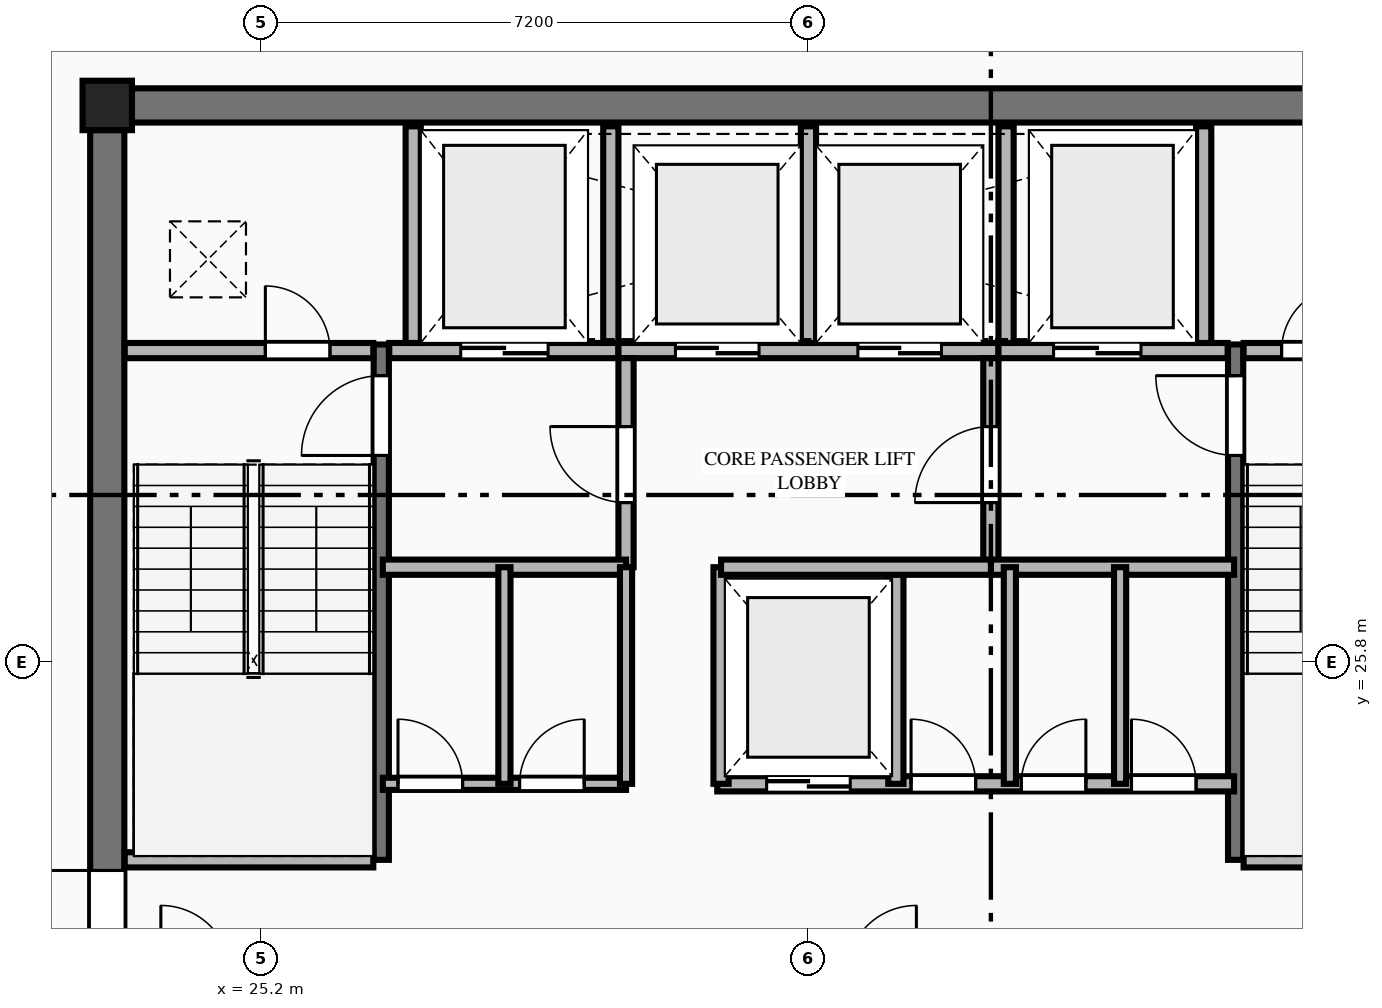
"""IFC4 building model, lengths in metres.
Left out: names, types, materials, properties, quantities, classifications, styles, units other than length and angle.
Written with IfcOpenShell. Run it as: python <this file> out.ifc"""

import sys

from ifc_helpers import new_model, si_unit, direction, frame, frame_2d, origin, origin_2d, place, context, subcontext, project, spatial, rectangle, extrude, element, fill, save


model = new_model("IFC4")
c1 = context("Model", 3, precision=1e-05, world=origin(), true_north=direction((0.0, 1.0)))
c2 = subcontext(c1, "Body", "Model", "MODEL_VIEW")
j1 = project(units=[si_unit("LENGTHUNIT", "METRE"), si_unit("PLANEANGLEUNIT", "RADIAN")], contexts=[c1])
p1 = place(None, origin())
s1 = spatial("IfcSite", under=j1, at=p1, CompositionType="ELEMENT")
p2 = place(p1, origin())
s2 = spatial("IfcBuilding", under=s1, at=p2, CompositionType="ELEMENT")
p3 = place(p2, frame((0.0, 0.0, 259.85)))
s3 = spatial("IfcBuildingStorey", under=s2, at=p3, CompositionType="ELEMENT", Elevation=259.85)
p4 = place(p3, frame((23.175, 33.125, 0.0), z_axis=(0.0, 0.0, 1.0), x_axis=(1.0, 0.0, 0.0)))
e1 = element("IfcColumn", 1, at=p4, inside=s3, PredefinedType="COLUMN", context=c2, shape_type="SweptSolid", body=[
    extrude(rectangle(XDim=0.65, YDim=0.65, at=origin_2d()), origin(), (0.0, 0.0, 1.0), 3.65),
])
p5 = place(p3, frame((23.5, 33.125, 0.0), z_axis=(0.0, 0.0, 1.0), x_axis=(1.0, 0.0, 0.0)))
e2 = element("IfcWall", 2, at=p5, inside=s3, PredefinedType="SHEAR", context=c2, shape_type="SweptSolid", body=[
    extrude(rectangle(XDim=17.8, YDim=0.45, at=frame_2d((8.9, 0.0))), origin(), (0.0, 0.0, 1.0), 3.45),
])
p6 = place(p3, frame((23.175, 19.0, 0.0), z_axis=(0.0, 0.0, 1.0), x_axis=(0.0, 1.0, 0.0)))
e3 = element("IfcWall", 3, at=p6, inside=s3, PredefinedType="SHEAR", context=c2, shape_type="SweptSolid", body=[
    extrude(rectangle(XDim=13.8, YDim=0.45, at=frame_2d((6.9, 0.0))), origin(), (0.0, 0.0, 1.0), 3.45),
])
p7 = place(p6, frame((2.84, 0.0, 0.0)))
e4 = element("IfcOpeningElement", 4, at=p7, cuts=e3, PredefinedType="OPENING", context=c2, shape_type="SweptSolid", body=[
    extrude(rectangle(XDim=1.22, YDim=2.25, at=frame_2d((0.61, 1.125))), frame((0.0, 0.235, 0.0), z_axis=(0.0, -1.0, 0.0), x_axis=(1.0, 0.0, 0.0)), (0.0, 0.0, 1.0), 0.47),
])
p8 = place(p3, frame((26.78, 23.2, 0.0), z_axis=(0.0, 0.0, 1.0), x_axis=(0.0, 1.0, 0.0)))
e5 = element("IfcWall", 5, at=p8, inside=s3, PredefinedType="SHEAR", context=c2, shape_type="SweptSolid", body=[
    extrude(rectangle(XDim=6.78, YDim=0.2, at=frame_2d((3.39, 0.0))), origin(), (0.0, 0.0, 1.0), 3.65),
])
p9 = place(p8, frame((5.32, 0.0, 0.0)))
e6 = element("IfcOpeningElement", 6, at=p9, cuts=e5, PredefinedType="OPENING", context=c2, shape_type="SweptSolid", body=[
    extrude(rectangle(XDim=1.05, YDim=2.15, at=frame_2d((0.525, 1.075))), frame((0.0, 0.11, 0.0), z_axis=(0.0, -1.0, 0.0), x_axis=(1.0, 0.0, 0.0)), (0.0, 0.0, 1.0), 0.22),
])
p10 = place(p3, frame((23.405, 23.2, 0.0), z_axis=(0.0, 0.0, 1.0), x_axis=(1.0, 0.0, 0.0)))
e7 = element("IfcWall", 7, at=p10, inside=s3, PredefinedType="PLUMBINGWALL", context=c2, shape_type="SweptSolid", body=[
    extrude(rectangle(XDim=3.27, YDim=0.2, at=frame_2d((1.635, 0.0))), origin(), (0.0, 0.0, 1.0), 3.45),
])
p11 = place(p3, frame((38.02, 23.2, 0.0), z_axis=(0.0, 0.0, 1.0), x_axis=(0.0, 1.0, 0.0)))
e8 = element("IfcWall", 8, at=p11, inside=s3, PredefinedType="SHEAR", context=c2, shape_type="SweptSolid", body=[
    extrude(rectangle(XDim=6.78, YDim=0.2, at=frame_2d((3.39, 0.0))), origin(), (0.0, 0.0, 1.0), 3.65),
])
p12 = place(p11, frame((5.32, 0.0, 0.0)))
e9 = element("IfcOpeningElement", 9, at=p12, cuts=e8, PredefinedType="OPENING", context=c2, shape_type="SweptSolid", body=[
    extrude(rectangle(XDim=1.05, YDim=2.15, at=frame_2d((0.525, 1.075))), frame((0.0, 0.11, 0.0), z_axis=(0.0, -1.0, 0.0), x_axis=(1.0, 0.0, 0.0)), (0.0, 0.0, 1.0), 0.22),
])
p13 = place(p3, frame((38.125, 23.2, 0.0), z_axis=(0.0, 0.0, 1.0), x_axis=(1.0, 0.0, 0.0)))
e10 = element("IfcWall", 10, at=p13, inside=s3, PredefinedType="PLUMBINGWALL", context=c2, shape_type="SweptSolid", body=[
    extrude(rectangle(XDim=3.27, YDim=0.2, at=frame_2d((1.635, 0.0))), origin(), (0.0, 0.0, 1.0), 3.45),
])
p14 = place(p3, frame((23.405, 29.9, 0.0), z_axis=(0.0, 0.0, 1.0), x_axis=(1.0, 0.0, 0.0)))
e11 = element("IfcWall", 11, at=p14, inside=s3, PredefinedType="PLUMBINGWALL", context=c2, shape_type="SweptSolid", body=[
    extrude(rectangle(XDim=3.27, YDim=0.2, at=frame_2d((1.635, 0.0))), origin(), (0.0, 0.0, 1.0), 3.45),
])
p15 = place(p14, frame((1.85, 0.0, 0.0)))
e12 = element("IfcOpeningElement", 12, at=p15, cuts=e11, PredefinedType="OPENING", context=c2, shape_type="SweptSolid", body=[
    extrude(rectangle(XDim=0.85, YDim=2.05, at=frame_2d((0.425, 1.025))), frame((0.0, 0.11, 0.0), z_axis=(0.0, -1.0, 0.0), x_axis=(1.0, 0.0, 0.0)), (0.0, 0.0, 1.0), 0.22),
])
p16 = place(p3, frame((26.885, 29.9, 0.0), z_axis=(0.0, 0.0, 1.0), x_axis=(1.0, 0.0, 0.0)))
e13 = element("IfcWall", 13, at=p16, inside=s3, PredefinedType="PLUMBINGWALL", context=c2, shape_type="SweptSolid", body=[
    extrude(rectangle(XDim=3.015, YDim=0.2, at=frame_2d((1.507, 0.0))), origin(), (0.0, 0.0, 1.0), 3.45),
])
p17 = place(p16, frame((0.94, 0.0, 0.0)))
e14 = element("IfcOpeningElement", 14, at=p17, cuts=e13, PredefinedType="OPENING", context=c2, shape_type="SweptSolid", body=[
    extrude(rectangle(XDim=1.15, YDim=2.2, at=frame_2d((0.575, 1.1))), frame((0.0, 0.11, 0.0), z_axis=(0.0, -1.0, 0.0), x_axis=(1.0, 0.0, 0.0)), (0.0, 0.0, 1.0), 0.22),
])
p18 = place(p3, frame((29.9, 29.9, 0.0), z_axis=(0.0, 0.0, 1.0), x_axis=(1.0, 0.0, 0.0)))
e15 = element("IfcWall", 15, at=p18, inside=s3, PredefinedType="PLUMBINGWALL", context=c2, shape_type="SweptSolid", body=[
    extrude(rectangle(XDim=5.0, YDim=0.2, at=frame_2d((2.5, 0.0))), origin(), (0.0, 0.0, 1.0), 3.45),
])
p19 = place(p18, frame((0.75, 0.0, 0.0)))
e16 = element("IfcOpeningElement", 16, at=p19, cuts=e15, PredefinedType="OPENING", context=c2, shape_type="SweptSolid", body=[
    extrude(rectangle(XDim=1.1, YDim=2.2, at=frame_2d((0.55, 1.1))), frame((0.0, 0.11, 0.0), z_axis=(0.0, -1.0, 0.0), x_axis=(1.0, 0.0, 0.0)), (0.0, 0.0, 1.0), 0.22),
])
p20 = place(p18, frame((3.15, 0.0, 0.0)))
e17 = element("IfcOpeningElement", 17, at=p20, cuts=e15, PredefinedType="OPENING", context=c2, shape_type="SweptSolid", body=[
    extrude(rectangle(XDim=1.1, YDim=2.2, at=frame_2d((0.55, 1.1))), frame((0.0, 0.11, 0.0), z_axis=(0.0, -1.0, 0.0), x_axis=(1.0, 0.0, 0.0)), (0.0, 0.0, 1.0), 0.22),
])
p21 = place(p3, frame((34.9, 29.9, 0.0), z_axis=(0.0, 0.0, 1.0), x_axis=(1.0, 0.0, 0.0)))
e18 = element("IfcWall", 18, at=p21, inside=s3, PredefinedType="PLUMBINGWALL", context=c2, shape_type="SweptSolid", body=[
    extrude(rectangle(XDim=3.015, YDim=0.2, at=frame_2d((1.508, 0.0))), origin(), (0.0, 0.0, 1.0), 3.45),
])
p22 = place(p21, frame((0.725, 0.0, 0.0)))
e19 = element("IfcOpeningElement", 19, at=p22, cuts=e18, PredefinedType="OPENING", context=c2, shape_type="SweptSolid", body=[
    extrude(rectangle(XDim=1.15, YDim=2.2, at=frame_2d((0.575, 1.1))), frame((0.0, 0.11, 0.0), z_axis=(0.0, -1.0, 0.0), x_axis=(1.0, 0.0, 0.0)), (0.0, 0.0, 1.0), 0.22),
])
p23 = place(p3, frame((38.125, 29.9, 0.0), z_axis=(0.0, 0.0, 1.0), x_axis=(1.0, 0.0, 0.0)))
e20 = element("IfcWall", 20, at=p23, inside=s3, PredefinedType="PLUMBINGWALL", context=c2, shape_type="SweptSolid", body=[
    extrude(rectangle(XDim=3.27, YDim=0.2, at=frame_2d((1.635, 0.0))), origin(), (0.0, 0.0, 1.0), 3.45),
])
p24 = place(p23, frame((0.5, 0.0, 0.0)))
e21 = element("IfcOpeningElement", 21, at=p24, cuts=e20, PredefinedType="OPENING", context=c2, shape_type="SweptSolid", body=[
    extrude(rectangle(XDim=0.85, YDim=2.05, at=frame_2d((0.425, 1.025))), frame((0.0, 0.11, 0.0), z_axis=(0.0, -1.0, 0.0), x_axis=(1.0, 0.0, 0.0)), (0.0, 0.0, 1.0), 0.22),
])
for number, where, z_axis, x_axis in (
    (22, (27.2, 30.0, 0.0), (0.0, 0.0, 1.0), (0.0, 1.0, 0.0)),
    (23, (29.8, 30.0, 0.0), (0.0, 0.0, 1.0), (0.0, 1.0, 0.0)),
    (24, (32.4, 30.0, 0.0), (0.0, 0.0, 1.0), (0.0, 1.0, 0.0)),
    (25, (35.0, 30.0, 0.0), (0.0, 0.0, 1.0), (0.0, 1.0, 0.0)),
    (26, (37.6, 30.0, 0.0), (0.0, 0.0, 1.0), (0.0, 1.0, 0.0)),
):
    element("IfcWall", number, at=place(p3, frame(where, z_axis=z_axis, x_axis=x_axis)), inside=s3, PredefinedType="PLUMBINGWALL", context=c2, shape_type="SweptSolid", body=[
        extrude(rectangle(XDim=2.85, YDim=0.2, at=frame_2d((1.425, 0.0))), origin(), (0.0, 0.0, 1.0), 3.45),
    ])
p25 = place(p3, frame((30.0, 27.05, 0.0), z_axis=(0.0, 0.0, 1.0), x_axis=(0.0, 1.0, 0.0)))
e27 = element("IfcWall", 27, at=p25, inside=s3, PredefinedType="PLUMBINGWALL", context=c2, shape_type="SweptSolid", body=[
    extrude(rectangle(XDim=2.75, YDim=0.2, at=frame_2d((1.375, 0.0))), origin(), (0.0, 0.0, 1.0), 3.45),
])
p26 = place(p25, frame((0.85, 0.0, 0.0)))
e28 = element("IfcOpeningElement", 28, at=p26, cuts=e27, PredefinedType="OPENING", context=c2, shape_type="SweptSolid", body=[
    extrude(rectangle(XDim=1.0, YDim=2.15, at=frame_2d((0.5, 1.075))), frame((0.0, 0.11, 0.0), z_axis=(0.0, -1.0, 0.0), x_axis=(1.0, 0.0, 0.0)), (0.0, 0.0, 1.0), 0.22),
])
p27 = place(p3, frame((26.8, 27.05, 0.0), z_axis=(0.0, 0.0, 1.0), x_axis=(1.0, 0.0, 0.0)))
e29 = element("IfcWall", 29, at=p27, inside=s3, PredefinedType="PLUMBINGWALL", context=c2, shape_type="SweptSolid", body=[
    extrude(rectangle(XDim=3.2, YDim=0.2, at=frame_2d((1.6, 0.0))), origin(), (0.0, 0.0, 1.0), 3.45),
])
p28 = place(p3, frame((34.8, 27.05, 0.0), z_axis=(0.0, 0.0, 1.0), x_axis=(0.0, 1.0, 0.0)))
e30 = element("IfcWall", 30, at=p28, inside=s3, PredefinedType="PLUMBINGWALL", context=c2, shape_type="SweptSolid", body=[
    extrude(rectangle(XDim=2.75, YDim=0.2, at=frame_2d((1.375, 0.0))), origin(), (0.0, 0.0, 1.0), 3.45),
])
p29 = place(p28, frame((0.85, 0.0, 0.0)))
e31 = element("IfcOpeningElement", 31, at=p29, cuts=e30, PredefinedType="OPENING", context=c2, shape_type="SweptSolid", body=[
    extrude(rectangle(XDim=1.0, YDim=2.15, at=frame_2d((0.5, 1.075))), frame((0.0, 0.11, 0.0), z_axis=(0.0, -1.0, 0.0), x_axis=(1.0, 0.0, 0.0)), (0.0, 0.0, 1.0), 0.22),
])
p30 = place(p3, frame((34.8, 27.05, 0.0), z_axis=(0.0, 0.0, 1.0), x_axis=(1.0, 0.0, 0.0)))
e32 = element("IfcWall", 32, at=p30, inside=s3, PredefinedType="PLUMBINGWALL", context=c2, shape_type="SweptSolid", body=[
    extrude(rectangle(XDim=3.2, YDim=0.2, at=frame_2d((1.6, 0.0))), origin(), (0.0, 0.0, 1.0), 3.45),
])
p31 = place(p3, frame((26.8, 24.2, 0.0), z_axis=(0.0, 0.0, 1.0), x_axis=(1.0, 0.0, 0.0)))
e33 = element("IfcWall", 33, at=p31, inside=s3, PredefinedType="PARTITIONING", context=c2, shape_type="SweptSolid", body=[
    extrude(rectangle(XDim=3.2, YDim=0.16, at=frame_2d((1.6, 0.0))), origin(), (0.0, 0.0, 1.0), 3.45),
])
p32 = place(p31, frame((0.2, 0.0, 0.0)))
e34 = element("IfcOpeningElement", 34, at=p32, cuts=e33, PredefinedType="OPENING", context=c2, shape_type="SweptSolid", body=[
    extrude(rectangle(XDim=0.85, YDim=2.05, at=frame_2d((0.425, 1.025))), frame((0.0, 0.09, 0.0), z_axis=(0.0, -1.0, 0.0), x_axis=(1.0, 0.0, 0.0)), (0.0, 0.0, 1.0), 0.18),
])
p33 = place(p31, frame((1.8, 0.0, 0.0)))
e35 = element("IfcOpeningElement", 35, at=p33, cuts=e33, PredefinedType="OPENING", context=c2, shape_type="SweptSolid", body=[
    extrude(rectangle(XDim=0.85, YDim=2.05, at=frame_2d((0.425, 1.025))), frame((0.0, 0.09, 0.0), z_axis=(0.0, -1.0, 0.0), x_axis=(1.0, 0.0, 0.0)), (0.0, 0.0, 1.0), 0.18),
])
p34 = place(p3, frame((30.0, 24.2, 0.0), z_axis=(0.0, 0.0, 1.0), x_axis=(0.0, 1.0, 0.0)))
e36 = element("IfcWall", 36, at=p34, inside=s3, PredefinedType="PARTITIONING", context=c2, shape_type="SweptSolid", body=[
    extrude(rectangle(XDim=2.85, YDim=0.16, at=frame_2d((1.425, 0.0))), origin(), (0.0, 0.0, 1.0), 3.45),
])
p35 = place(p3, frame((31.2, 24.2, 0.0), z_axis=(0.0, 0.0, 1.0), x_axis=(1.0, 0.0, 0.0)))
e37 = element("IfcWall", 37, at=p35, inside=s3, PredefinedType="PLUMBINGWALL", context=c2, shape_type="SweptSolid", body=[
    extrude(rectangle(XDim=6.8, YDim=0.2, at=frame_2d((3.4, 0.0))), origin(), (0.0, 0.0, 1.0), 3.45),
])
p36 = place(p35, frame((0.65, 0.0, 0.0)))
e38 = element("IfcOpeningElement", 38, at=p36, cuts=e37, PredefinedType="OPENING", context=c2, shape_type="SweptSolid", body=[
    extrude(rectangle(XDim=1.1, YDim=2.2, at=frame_2d((0.55, 1.1))), frame((0.0, 0.11, 0.0), z_axis=(0.0, -1.0, 0.0), x_axis=(1.0, 0.0, 0.0)), (0.0, 0.0, 1.0), 0.22),
])
p37 = place(p35, frame((2.55, 0.0, 0.0)))
e39 = element("IfcOpeningElement", 39, at=p37, cuts=e37, PredefinedType="OPENING", context=c2, shape_type="SweptSolid", body=[
    extrude(rectangle(XDim=0.85, YDim=2.05, at=frame_2d((0.425, 1.025))), frame((0.0, 0.11, 0.0), z_axis=(0.0, -1.0, 0.0), x_axis=(1.0, 0.0, 0.0)), (0.0, 0.0, 1.0), 0.22),
])
p38 = place(p35, frame((4.0, 0.0, 0.0)))
e40 = element("IfcOpeningElement", 40, at=p38, cuts=e37, PredefinedType="OPENING", context=c2, shape_type="SweptSolid", body=[
    extrude(rectangle(XDim=0.85, YDim=2.05, at=frame_2d((0.425, 1.025))), frame((0.0, 0.11, 0.0), z_axis=(0.0, -1.0, 0.0), x_axis=(1.0, 0.0, 0.0)), (0.0, 0.0, 1.0), 0.22),
])
p39 = place(p35, frame((5.45, 0.0, 0.0)))
e41 = element("IfcOpeningElement", 41, at=p39, cuts=e37, PredefinedType="OPENING", context=c2, shape_type="SweptSolid", body=[
    extrude(rectangle(XDim=0.85, YDim=2.05, at=frame_2d((0.425, 1.025))), frame((0.0, 0.11, 0.0), z_axis=(0.0, -1.0, 0.0), x_axis=(1.0, 0.0, 0.0)), (0.0, 0.0, 1.0), 0.22),
])
for number, where, z_axis, x_axis in (
    (42, (31.25, 24.2, 0.0), (0.0, 0.0, 1.0), (0.0, 1.0, 0.0)),
    (43, (33.55, 24.2, 0.0), (0.0, 0.0, 1.0), (0.0, 1.0, 0.0)),
):
    element("IfcWall", number, at=place(p3, frame(where, z_axis=z_axis, x_axis=x_axis)), inside=s3, PredefinedType="PLUMBINGWALL", context=c2, shape_type="SweptSolid", body=[
        extrude(rectangle(XDim=2.85, YDim=0.2, at=frame_2d((1.425, 0.0))), origin(), (0.0, 0.0, 1.0), 3.45),
    ])
p40 = place(p3, frame((31.25, 27.05, 0.0), z_axis=(0.0, 0.0, 1.0), x_axis=(1.0, 0.0, 0.0)))
e44 = element("IfcWall", 44, at=p40, inside=s3, PredefinedType="PLUMBINGWALL", context=c2, shape_type="SweptSolid", body=[
    extrude(rectangle(XDim=3.55, YDim=0.2, at=frame_2d((1.775, 0.0))), origin(), (0.0, 0.0, 1.0), 3.45),
])
for number, where, z_axis, x_axis in (
    (45, (28.4, 24.2, 0.0), (0.0, 0.0, 1.0), (0.0, 1.0, 0.0)),
    (46, (35.05, 24.2, 0.0), (0.0, 0.0, 1.0), (0.0, 1.0, 0.0)),
    (47, (36.5, 24.2, 0.0), (0.0, 0.0, 1.0), (0.0, 1.0, 0.0)),
):
    element("IfcWall", number, at=place(p3, frame(where, z_axis=z_axis, x_axis=x_axis)), inside=s3, PredefinedType="PARTITIONING", context=c2, shape_type="SweptSolid", body=[
        extrude(rectangle(XDim=2.85, YDim=0.16, at=frame_2d((1.425, 0.0))), origin(), (0.0, 0.0, 1.0), 3.45),
    ])
p41 = place(p7, origin())
e48 = element("IfcDoor", 48, at=p41, inside=s3, OperationType="SINGLE_SWING_RIGHT", PredefinedType="DOOR", context=c2, shape_type="SweptSolid", body=[
    extrude(rectangle(XDim=1.22, YDim=2.25, at=frame_2d((0.61, 1.125))), frame((0.0, 0.025, 0.0), z_axis=(0.0, -1.0, 0.0), x_axis=(1.0, 0.0, 0.0)), (0.0, 0.0, 1.0), 0.05),
])
fill(e4, e48)
p42 = place(p9, origin())
e49 = element("IfcDoor", 49, at=p42, inside=s3, OperationType="SINGLE_SWING_LEFT", PredefinedType="DOOR", context=c2, shape_type="SweptSolid", body=[
    extrude(rectangle(XDim=1.05, YDim=2.15, at=frame_2d((0.525, 1.075))), frame((0.0, 0.025, 0.0), z_axis=(0.0, -1.0, 0.0), x_axis=(1.0, 0.0, 0.0)), (0.0, 0.0, 1.0), 0.05),
])
fill(e6, e49)
p43 = place(p12, origin())
e50 = element("IfcDoor", 50, at=p43, inside=s3, OperationType="SINGLE_SWING_RIGHT", PredefinedType="DOOR", context=c2, shape_type="SweptSolid", body=[
    extrude(rectangle(XDim=1.05, YDim=2.15, at=frame_2d((0.525, 1.075))), frame((0.0, 0.025, 0.0), z_axis=(0.0, -1.0, 0.0), x_axis=(1.0, 0.0, 0.0)), (0.0, 0.0, 1.0), 0.05),
])
fill(e9, e50)
p44 = place(p15, origin())
e51 = element("IfcDoor", 51, at=p44, inside=s3, OperationType="SINGLE_SWING_LEFT", PredefinedType="DOOR", context=c2, shape_type="SweptSolid", body=[
    extrude(rectangle(XDim=0.85, YDim=2.05, at=frame_2d((0.425, 1.025))), frame((0.0, 0.025, 0.0), z_axis=(0.0, -1.0, 0.0), x_axis=(1.0, 0.0, 0.0)), (0.0, 0.0, 1.0), 0.05),
])
fill(e12, e51)
p45 = place(p24, origin())
e52 = element("IfcDoor", 52, at=p45, inside=s3, OperationType="SINGLE_SWING_RIGHT", PredefinedType="DOOR", context=c2, shape_type="SweptSolid", body=[
    extrude(rectangle(XDim=0.85, YDim=2.05, at=frame_2d((0.425, 1.025))), frame((0.0, 0.025, 0.0), z_axis=(0.0, -1.0, 0.0), x_axis=(1.0, 0.0, 0.0)), (0.0, 0.0, 1.0), 0.05),
])
fill(e21, e52)
p46 = place(p17, origin())
e53 = element("IfcDoor", 53, at=p46, inside=s3, OperationType="DOUBLE_DOOR_SLIDING", PredefinedType="DOOR", context=c2, shape_type="SweptSolid", body=[
    extrude(rectangle(XDim=1.15, YDim=2.2, at=frame_2d((0.575, 1.1))), frame((0.0, 0.025, 0.0), z_axis=(0.0, -1.0, 0.0), x_axis=(1.0, 0.0, 0.0)), (0.0, 0.0, 1.0), 0.05),
])
fill(e14, e53)
p47 = place(p22, origin())
e54 = element("IfcDoor", 54, at=p47, inside=s3, OperationType="DOUBLE_DOOR_SLIDING", PredefinedType="DOOR", context=c2, shape_type="SweptSolid", body=[
    extrude(rectangle(XDim=1.15, YDim=2.2, at=frame_2d((0.575, 1.1))), frame((0.0, 0.025, 0.0), z_axis=(0.0, -1.0, 0.0), x_axis=(1.0, 0.0, 0.0)), (0.0, 0.0, 1.0), 0.05),
])
fill(e19, e54)
p48 = place(p19, origin())
e55 = element("IfcDoor", 55, at=p48, inside=s3, OperationType="DOUBLE_DOOR_SLIDING", PredefinedType="DOOR", context=c2, shape_type="SweptSolid", body=[
    extrude(rectangle(XDim=1.1, YDim=2.2, at=frame_2d((0.55, 1.1))), frame((0.0, 0.025, 0.0), z_axis=(0.0, -1.0, 0.0), x_axis=(1.0, 0.0, 0.0)), (0.0, 0.0, 1.0), 0.05),
])
fill(e16, e55)
p49 = place(p20, origin())
e56 = element("IfcDoor", 56, at=p49, inside=s3, OperationType="DOUBLE_DOOR_SLIDING", PredefinedType="DOOR", context=c2, shape_type="SweptSolid", body=[
    extrude(rectangle(XDim=1.1, YDim=2.2, at=frame_2d((0.55, 1.1))), frame((0.0, 0.025, 0.0), z_axis=(0.0, -1.0, 0.0), x_axis=(1.0, 0.0, 0.0)), (0.0, 0.0, 1.0), 0.05),
])
fill(e17, e56)
p50 = place(p26, origin())
e57 = element("IfcDoor", 57, at=p50, inside=s3, OperationType="SINGLE_SWING_RIGHT", PredefinedType="DOOR", context=c2, shape_type="SweptSolid", body=[
    extrude(rectangle(XDim=1.0, YDim=2.15, at=frame_2d((0.5, 1.075))), frame((0.0, 0.025, 0.0), z_axis=(0.0, -1.0, 0.0), x_axis=(1.0, 0.0, 0.0)), (0.0, 0.0, 1.0), 0.05),
])
fill(e28, e57)
p51 = place(p29, origin())
e58 = element("IfcDoor", 58, at=p51, inside=s3, OperationType="SINGLE_SWING_LEFT", PredefinedType="DOOR", context=c2, shape_type="SweptSolid", body=[
    extrude(rectangle(XDim=1.0, YDim=2.15, at=frame_2d((0.5, 1.075))), frame((0.0, 0.025, 0.0), z_axis=(0.0, -1.0, 0.0), x_axis=(1.0, 0.0, 0.0)), (0.0, 0.0, 1.0), 0.05),
])
fill(e31, e58)
p52 = place(p36, origin())
e59 = element("IfcDoor", 59, at=p52, inside=s3, OperationType="DOUBLE_DOOR_SLIDING", PredefinedType="DOOR", context=c2, shape_type="SweptSolid", body=[
    extrude(rectangle(XDim=1.1, YDim=2.2, at=frame_2d((0.55, 1.1))), frame((0.0, 0.025, 0.0), z_axis=(0.0, -1.0, 0.0), x_axis=(1.0, 0.0, 0.0)), (0.0, 0.0, 1.0), 0.05),
])
fill(e38, e59)
p53 = place(p32, origin())
e60 = element("IfcDoor", 60, at=p53, inside=s3, OperationType="SINGLE_SWING_LEFT", PredefinedType="DOOR", context=c2, shape_type="SweptSolid", body=[
    extrude(rectangle(XDim=0.85, YDim=2.05, at=frame_2d((0.425, 1.025))), frame((0.0, 0.025, 0.0), z_axis=(0.0, -1.0, 0.0), x_axis=(1.0, 0.0, 0.0)), (0.0, 0.0, 1.0), 0.05),
])
fill(e34, e60)
p54 = place(p33, origin())
e61 = element("IfcDoor", 61, at=p54, inside=s3, OperationType="SINGLE_SWING_RIGHT", PredefinedType="DOOR", context=c2, shape_type="SweptSolid", body=[
    extrude(rectangle(XDim=0.85, YDim=2.05, at=frame_2d((0.425, 1.025))), frame((0.0, 0.025, 0.0), z_axis=(0.0, -1.0, 0.0), x_axis=(1.0, 0.0, 0.0)), (0.0, 0.0, 1.0), 0.05),
])
fill(e35, e61)
p55 = place(p37, origin())
e62 = element("IfcDoor", 62, at=p55, inside=s3, OperationType="SINGLE_SWING_LEFT", PredefinedType="DOOR", context=c2, shape_type="SweptSolid", body=[
    extrude(rectangle(XDim=0.85, YDim=2.05, at=frame_2d((0.425, 1.025))), frame((0.0, 0.025, 0.0), z_axis=(0.0, -1.0, 0.0), x_axis=(1.0, 0.0, 0.0)), (0.0, 0.0, 1.0), 0.05),
])
fill(e39, e62)
p56 = place(p38, origin())
e63 = element("IfcDoor", 63, at=p56, inside=s3, OperationType="SINGLE_SWING_RIGHT", PredefinedType="DOOR", context=c2, shape_type="SweptSolid", body=[
    extrude(rectangle(XDim=0.85, YDim=2.05, at=frame_2d((0.425, 1.025))), frame((0.0, 0.025, 0.0), z_axis=(0.0, -1.0, 0.0), x_axis=(1.0, 0.0, 0.0)), (0.0, 0.0, 1.0), 0.05),
])
fill(e40, e63)
p57 = place(p39, origin())
e64 = element("IfcDoor", 64, at=p57, inside=s3, OperationType="SINGLE_SWING_LEFT", PredefinedType="DOOR", context=c2, shape_type="SweptSolid", body=[
    extrude(rectangle(XDim=0.85, YDim=2.05, at=frame_2d((0.425, 1.025))), frame((0.0, 0.025, 0.0), z_axis=(0.0, -1.0, 0.0), x_axis=(1.0, 0.0, 0.0)), (0.0, 0.0, 1.0), 0.05),
])
fill(e41, e64)
save(model, sys.argv[1])
